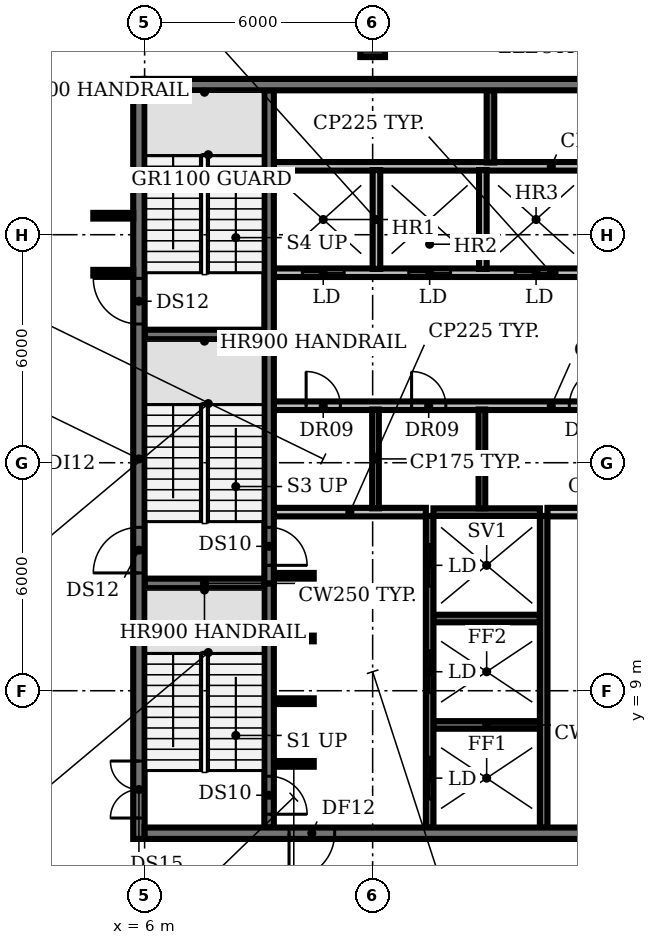
"""IFC4 building model, lengths in metres.
Left out: names, types, materials, properties, quantities, classifications, styles, units other than length and angle.
Written with IfcOpenShell. Run it as: python <this file> out.ifc"""

import sys

from ifc_helpers import new_model, si_unit, direction, frame, frame_2d, origin, origin_2d, place, context, subcontext, project, spatial, rectangle, extrude, element, fill, save


model = new_model("IFC4")
c1 = context("Model", 3, precision=1e-05, world=origin(), true_north=direction((0.0, 1.0)))
c2 = subcontext(c1, "Body", "Model", "MODEL_VIEW")
j1 = project(units=[si_unit("LENGTHUNIT", "METRE"), si_unit("PLANEANGLEUNIT", "RADIAN")], contexts=[c1])
p1 = place(None, origin())
s1 = spatial("IfcSite", under=j1, at=p1, CompositionType="ELEMENT")
p2 = place(p1, origin())
s2 = spatial("IfcBuilding", under=s1, at=p2, CompositionType="ELEMENT")
p3 = place(p2, frame((0.0, 0.0, 272.6)))
s3 = spatial("IfcBuildingStorey", under=s2, at=p3, CompositionType="ELEMENT", Elevation=272.6)
p4 = place(p3, frame((12.0, 26.0, 0.0), z_axis=(0.0, 0.0, 1.0), x_axis=(1.0, 0.0, 0.0)))
e1 = element("IfcColumn", 1, at=p4, inside=s3, PredefinedType="COLUMN", context=c2, shape_type="SweptSolid", body=[
    extrude(rectangle(XDim=0.65, YDim=0.65, at=origin_2d()), origin(), (0.0, 0.0, 1.0), 3.85),
])
p5 = place(p3, frame((9.4, 7.075, 0.0), z_axis=(0.0, 0.0, 1.0), x_axis=(1.0, 0.0, 0.0)))
e2 = element("IfcWall", 2, at=p5, inside=s3, PredefinedType="SHEAR", context=c2, shape_type="SweptSolid", body=[
    extrude(rectangle(XDim=1.05, YDim=0.15, at=frame_2d((0.525, 0.0))), origin(), (0.0, 0.0, 1.0), 3.85),
])
p6 = place(p3, frame((13.6, 8.1, 0.0), z_axis=(0.0, 0.0, 1.0), x_axis=(1.0, 0.0, 0.0)))
e3 = element("IfcWall", 3, at=p6, inside=s3, PredefinedType="SHEAR", context=c2, shape_type="SweptSolid", body=[
    extrude(rectangle(XDim=2.8, YDim=0.2, at=frame_2d((1.4, 0.0))), origin(), (0.0, 0.0, 1.0), 3.85),
])
for number, where, z_axis, x_axis in (
    (4, (9.4, 8.725, 0.0), (0.0, 0.0, 1.0), (1.0, 0.0, 0.0)),
    (5, (9.4, 10.375, 0.0), (0.0, 0.0, 1.0), (1.0, 0.0, 0.0)),
):
    element("IfcWall", number, at=place(p3, frame(where, z_axis=z_axis, x_axis=x_axis)), inside=s3, PredefinedType="SHEAR", context=c2, shape_type="SweptSolid", body=[
        extrude(rectangle(XDim=1.05, YDim=0.15, at=frame_2d((0.525, 0.0))), origin(), (0.0, 0.0, 1.0), 3.85),
    ])
p7 = place(p3, frame((13.6, 10.9, 0.0), z_axis=(0.0, 0.0, 1.0), x_axis=(1.0, 0.0, 0.0)))
e6 = element("IfcWall", 6, at=p7, inside=s3, PredefinedType="SHEAR", context=c2, shape_type="SweptSolid", body=[
    extrude(rectangle(XDim=2.8, YDim=0.2, at=frame_2d((1.4, 0.0))), origin(), (0.0, 0.0, 1.0), 3.85),
])
p8 = place(p3, frame((6.0, 11.825, 0.0), z_axis=(0.0, 0.0, 1.0), x_axis=(1.0, 0.0, 0.0)))
e7 = element("IfcWall", 7, at=p8, inside=s3, PredefinedType="SHEAR", context=c2, shape_type="SweptSolid", body=[
    extrude(rectangle(XDim=3.15, YDim=0.25, at=frame_2d((1.575, 0.0))), origin(), (0.0, 0.0, 1.0), 3.85),
])
p9 = place(p3, frame((9.4, 12.025, 0.0), z_axis=(0.0, 0.0, 1.0), x_axis=(1.0, 0.0, 0.0)))
e8 = element("IfcWall", 8, at=p9, inside=s3, PredefinedType="SHEAR", context=c2, shape_type="SweptSolid", body=[
    extrude(rectangle(XDim=1.05, YDim=0.15, at=frame_2d((0.525, 0.0))), origin(), (0.0, 0.0, 1.0), 3.85),
])
p10 = place(p3, frame((9.4, 13.7, 0.0), z_axis=(0.0, 0.0, 1.0), x_axis=(1.0, 0.0, 0.0)))
e9 = element("IfcWall", 9, at=p10, inside=s3, PredefinedType="PARTITIONING", context=c2, shape_type="SweptSolid", body=[
    extrude(rectangle(XDim=4.0, YDim=0.225, at=frame_2d((2.0, 0.0))), origin(), (0.0, 0.0, 1.0), 3.85),
])
p11 = place(p3, frame((13.6, 13.7, 0.0), z_axis=(0.0, 0.0, 1.0), x_axis=(1.0, 0.0, 0.0)))
e10 = element("IfcWall", 10, at=p11, inside=s3, PredefinedType="SHEAR", context=c2, shape_type="SweptSolid", body=[
    extrude(rectangle(XDim=2.8, YDim=0.2, at=frame_2d((1.4, 0.0))), origin(), (0.0, 0.0, 1.0), 3.85),
])
p12 = place(p3, frame((16.6, 13.7, 0.0), z_axis=(0.0, 0.0, 1.0), x_axis=(1.0, 0.0, 0.0)))
e11 = element("IfcWall", 11, at=p12, inside=s3, PredefinedType="PARTITIONING", context=c2, shape_type="SweptSolid", body=[
    extrude(rectangle(XDim=7.4, YDim=0.225, at=frame_2d((3.7, 0.0))), origin(), (0.0, 0.0, 1.0), 3.85),
])
p13 = place(p3, frame((9.4, 16.5, 0.0), z_axis=(0.0, 0.0, 1.0), x_axis=(1.0, 0.0, 0.0)))
e12 = element("IfcWall", 12, at=p13, inside=s3, PredefinedType="PARTITIONING", context=c2, shape_type="SweptSolid", body=[
    extrude(rectangle(XDim=14.6, YDim=0.225, at=frame_2d((7.3, 0.0))), origin(), (0.0, 0.0, 1.0), 3.85),
])
p14 = place(p13, frame((0.85, 0.0, 0.0)))
e13 = element("IfcOpeningElement", 13, at=p14, cuts=e12, PredefinedType="OPENING", context=c2, shape_type="SweptSolid", body=[
    extrude(rectangle(XDim=0.9, YDim=2.1, at=frame_2d((0.45, 1.05))), frame((0.0, 0.123, 0.0), z_axis=(0.0, -1.0, 0.0), x_axis=(1.0, 0.0, 0.0)), (0.0, 0.0, 1.0), 0.245),
])
p15 = place(p13, frame((3.625, 0.0, 0.0)))
e14 = element("IfcOpeningElement", 14, at=p15, cuts=e12, PredefinedType="OPENING", context=c2, shape_type="SweptSolid", body=[
    extrude(rectangle(XDim=0.9, YDim=2.1, at=frame_2d((0.45, 1.05))), frame((0.0, 0.123, 0.0), z_axis=(0.0, -1.0, 0.0), x_axis=(1.0, 0.0, 0.0)), (0.0, 0.0, 1.0), 0.245),
])
p16 = place(p13, frame((7.775, 0.0, 0.0)))
e15 = element("IfcOpeningElement", 15, at=p16, cuts=e12, PredefinedType="OPENING", context=c2, shape_type="SweptSolid", body=[
    extrude(rectangle(XDim=1.0, YDim=2.1, at=frame_2d((0.5, 1.05))), frame((0.0, 0.123, 0.0), z_axis=(0.0, -1.0, 0.0), x_axis=(1.0, 0.0, 0.0)), (0.0, 0.0, 1.0), 0.245),
])
p17 = place(p13, frame((12.4, 0.0, 0.0)))
e16 = element("IfcOpeningElement", 16, at=p17, cuts=e12, PredefinedType="OPENING", context=c2, shape_type="SweptSolid", body=[
    extrude(rectangle(XDim=1.0, YDim=2.1, at=frame_2d((0.5, 1.05))), frame((0.0, 0.123, 0.0), z_axis=(0.0, -1.0, 0.0), x_axis=(1.0, 0.0, 0.0)), (0.0, 0.0, 1.0), 0.245),
])
p18 = place(p3, frame((6.0, 18.375, 0.0), z_axis=(0.0, 0.0, 1.0), x_axis=(1.0, 0.0, 0.0)))
e17 = element("IfcWall", 17, at=p18, inside=s3, PredefinedType="SHEAR", context=c2, shape_type="SweptSolid", body=[
    extrude(rectangle(XDim=3.15, YDim=0.25, at=frame_2d((1.575, 0.0))), origin(), (0.0, 0.0, 1.0), 3.85),
])
p19 = place(p3, frame((24.0, 20.0, 0.0), z_axis=(0.0, 0.0, 1.0), x_axis=(-1.0, 0.0, 0.0)))
e18 = element("IfcWall", 18, at=p19, inside=s3, PredefinedType="PARTITIONING", context=c2, shape_type="SweptSolid", body=[
    extrude(rectangle(XDim=14.6, YDim=0.225, at=frame_2d((7.3, 0.0))), origin(), (0.0, 0.0, 1.0), 3.85),
])
p20 = place(p19, frame((12.75, 0.0, 0.0)))
e19 = element("IfcOpeningElement", 19, at=p20, cuts=e18, PredefinedType="OPENING", context=c2, shape_type="SweptSolid", body=[
    extrude(rectangle(XDim=1.1, YDim=2.1, at=frame_2d((0.55, 1.05))), frame((0.0, 0.123, 0.0), z_axis=(0.0, -1.0, 0.0), x_axis=(1.0, 0.0, 0.0)), (0.0, 0.0, 1.0), 0.245),
])
p21 = place(p19, frame((9.95, 0.0, 0.0)))
e20 = element("IfcOpeningElement", 20, at=p21, cuts=e18, PredefinedType="OPENING", context=c2, shape_type="SweptSolid", body=[
    extrude(rectangle(XDim=1.1, YDim=2.1, at=frame_2d((0.55, 1.05))), frame((0.0, 0.123, 0.0), z_axis=(0.0, -1.0, 0.0), x_axis=(1.0, 0.0, 0.0)), (0.0, 0.0, 1.0), 0.245),
])
p22 = place(p19, frame((7.15, 0.0, 0.0)))
e21 = element("IfcOpeningElement", 21, at=p22, cuts=e18, PredefinedType="OPENING", context=c2, shape_type="SweptSolid", body=[
    extrude(rectangle(XDim=1.1, YDim=2.1, at=frame_2d((0.55, 1.05))), frame((0.0, 0.123, 0.0), z_axis=(0.0, -1.0, 0.0), x_axis=(1.0, 0.0, 0.0)), (0.0, 0.0, 1.0), 0.245),
])
p23 = place(p19, frame((4.35, 0.0, 0.0)))
e22 = element("IfcOpeningElement", 22, at=p23, cuts=e18, PredefinedType="OPENING", context=c2, shape_type="SweptSolid", body=[
    extrude(rectangle(XDim=1.1, YDim=2.1, at=frame_2d((0.55, 1.05))), frame((0.0, 0.123, 0.0), z_axis=(0.0, -1.0, 0.0), x_axis=(1.0, 0.0, 0.0)), (0.0, 0.0, 1.0), 0.245),
])
p24 = place(p19, frame((1.2, 0.0, 0.0)))
e23 = element("IfcOpeningElement", 23, at=p24, cuts=e18, PredefinedType="OPENING", context=c2, shape_type="SweptSolid", body=[
    extrude(rectangle(XDim=1.0, YDim=2.1, at=frame_2d((0.5, 1.05))), frame((0.0, 0.123, 0.0), z_axis=(0.0, -1.0, 0.0), x_axis=(1.0, 0.0, 0.0)), (0.0, 0.0, 1.0), 0.245),
])
p25 = place(p3, frame((9.4, 22.8, 0.0), z_axis=(0.0, 0.0, 1.0), x_axis=(1.0, 0.0, 0.0)))
e24 = element("IfcWall", 24, at=p25, inside=s3, PredefinedType="PARTITIONING", context=c2, shape_type="SweptSolid", body=[
    extrude(rectangle(XDim=14.6, YDim=0.225, at=frame_2d((7.3, 0.0))), origin(), (0.0, 0.0, 1.0), 3.85),
])
p26 = place(p3, frame((9.275, 11.825, 0.0), z_axis=(0.0, 0.0, 1.0), x_axis=(0.0, -1.0, 0.0)))
e25 = element("IfcWall", 25, at=p26, inside=s3, PredefinedType="SHEAR", context=c2, shape_type="SweptSolid", body=[
    extrude(rectangle(XDim=6.425, YDim=0.25, at=frame_2d((3.212, 0.0))), origin(), (0.0, 0.0, 1.0), 3.85),
])
p27 = place(p26, frame((5.075, 0.0, 0.0)))
e26 = element("IfcOpeningElement", 26, at=p27, cuts=e25, PredefinedType="OPENING", context=c2, shape_type="SweptSolid", body=[
    extrude(rectangle(XDim=1.0, YDim=2.1, at=frame_2d((0.5, 1.05))), frame((0.0, 0.135, 0.0), z_axis=(0.0, -1.0, 0.0), x_axis=(1.0, 0.0, 0.0)), (0.0, 0.0, 1.0), 0.27),
])
p28 = place(p3, frame((9.275, 18.375, 0.0), z_axis=(0.0, 0.0, 1.0), x_axis=(0.0, -1.0, 0.0)))
e27 = element("IfcWall", 27, at=p28, inside=s3, PredefinedType="SHEAR", context=c2, shape_type="SweptSolid", body=[
    extrude(rectangle(XDim=6.55, YDim=0.25, at=frame_2d((3.275, 0.0))), origin(), (0.0, 0.0, 1.0), 3.85),
])
p29 = place(p28, frame((5.075, 0.0, 0.0)))
e28 = element("IfcOpeningElement", 28, at=p29, cuts=e27, PredefinedType="OPENING", context=c2, shape_type="SweptSolid", body=[
    extrude(rectangle(XDim=1.0, YDim=2.1, at=frame_2d((0.5, 1.05))), frame((0.0, 0.135, 0.0), z_axis=(0.0, -1.0, 0.0), x_axis=(1.0, 0.0, 0.0)), (0.0, 0.0, 1.0), 0.27),
])
p30 = place(p3, frame((9.275, 18.375, 0.0), z_axis=(0.0, 0.0, 1.0), x_axis=(0.0, 1.0, 0.0)))
e29 = element("IfcWall", 29, at=p30, inside=s3, PredefinedType="SHEAR", context=c2, shape_type="SweptSolid", body=[
    extrude(rectangle(XDim=6.425, YDim=0.25, at=frame_2d((3.212, 0.0))), origin(), (0.0, 0.0, 1.0), 3.85),
])
p31 = place(p3, frame((12.075, 13.8, 0.0), z_axis=(0.0, 0.0, 1.0), x_axis=(0.0, 1.0, 0.0)))
e30 = element("IfcWall", 30, at=p31, inside=s3, PredefinedType="PARTITIONING", context=c2, shape_type="SweptSolid", body=[
    extrude(rectangle(XDim=2.6, YDim=0.175, at=frame_2d((1.3, 0.0))), origin(), (0.0, 0.0, 1.0), 3.85),
])
p32 = place(p3, frame((12.1, 20.1, 0.0), z_axis=(0.0, 0.0, 1.0), x_axis=(0.0, 1.0, 0.0)))
e31 = element("IfcWall", 31, at=p32, inside=s3, PredefinedType="SOLIDWALL", context=c2, shape_type="SweptSolid", body=[
    extrude(rectangle(XDim=2.6, YDim=0.2, at=frame_2d((1.3, 0.0))), origin(), (0.0, 0.0, 1.0), 3.85),
])
p33 = place(p3, frame((13.5, 5.4, 0.0), z_axis=(0.0, 0.0, 1.0), x_axis=(0.0, 1.0, 0.0)))
e32 = element("IfcWall", 32, at=p33, inside=s3, PredefinedType="SHEAR", context=c2, shape_type="SweptSolid", body=[
    extrude(rectangle(XDim=8.2, YDim=0.2, at=frame_2d((4.1, 0.0))), origin(), (0.0, 0.0, 1.0), 3.85),
])
p34 = place(p33, frame((0.75, 0.0, 0.0)))
e33 = element("IfcOpeningElement", 33, at=p34, cuts=e32, PredefinedType="OPENING", context=c2, shape_type="SweptSolid", body=[
    extrude(rectangle(XDim=1.1, YDim=2.1, at=frame_2d((0.55, 1.05))), frame((0.0, 0.11, 0.0), z_axis=(0.0, -1.0, 0.0), x_axis=(1.0, 0.0, 0.0)), (0.0, 0.0, 1.0), 0.22),
])
p35 = place(p33, frame((3.55, 0.0, 0.0)))
e34 = element("IfcOpeningElement", 34, at=p35, cuts=e32, PredefinedType="OPENING", context=c2, shape_type="SweptSolid", body=[
    extrude(rectangle(XDim=1.1, YDim=2.1, at=frame_2d((0.55, 1.05))), frame((0.0, 0.11, 0.0), z_axis=(0.0, -1.0, 0.0), x_axis=(1.0, 0.0, 0.0)), (0.0, 0.0, 1.0), 0.22),
])
p36 = place(p33, frame((6.35, 0.0, 0.0)))
e35 = element("IfcOpeningElement", 35, at=p36, cuts=e32, PredefinedType="OPENING", context=c2, shape_type="SweptSolid", body=[
    extrude(rectangle(XDim=1.1, YDim=2.1, at=frame_2d((0.55, 1.05))), frame((0.0, 0.11, 0.0), z_axis=(0.0, -1.0, 0.0), x_axis=(1.0, 0.0, 0.0)), (0.0, 0.0, 1.0), 0.22),
])
p37 = place(p3, frame((14.875, 13.8, 0.0), z_axis=(0.0, 0.0, 1.0), x_axis=(0.0, 1.0, 0.0)))
e36 = element("IfcWall", 36, at=p37, inside=s3, PredefinedType="PARTITIONING", context=c2, shape_type="SweptSolid", body=[
    extrude(rectangle(XDim=2.6, YDim=0.175, at=frame_2d((1.3, 0.0))), origin(), (0.0, 0.0, 1.0), 3.85),
])
p38 = place(p3, frame((14.9, 20.1, 0.0), z_axis=(0.0, 0.0, 1.0), x_axis=(0.0, 1.0, 0.0)))
e37 = element("IfcWall", 37, at=p38, inside=s3, PredefinedType="SOLIDWALL", context=c2, shape_type="SweptSolid", body=[
    extrude(rectangle(XDim=2.6, YDim=0.2, at=frame_2d((1.3, 0.0))), origin(), (0.0, 0.0, 1.0), 3.85),
])
p39 = place(p3, frame((15.1, 22.9, 0.0), z_axis=(0.0, 0.0, 1.0), x_axis=(0.0, 1.0, 0.0)))
e38 = element("IfcWall", 38, at=p39, inside=s3, PredefinedType="SHEAR", context=c2, shape_type="SweptSolid", body=[
    extrude(rectangle(XDim=1.9, YDim=0.2, at=frame_2d((0.95, 0.0))), origin(), (0.0, 0.0, 1.0), 3.85),
])
p40 = place(p3, frame((16.5, 5.4, 0.0), z_axis=(0.0, 0.0, 1.0), x_axis=(0.0, 1.0, 0.0)))
e39 = element("IfcWall", 39, at=p40, inside=s3, PredefinedType="SHEAR", context=c2, shape_type="SweptSolid", body=[
    extrude(rectangle(XDim=8.2, YDim=0.2, at=frame_2d((4.1, 0.0))), origin(), (0.0, 0.0, 1.0), 3.85),
])
p41 = place(p3, frame((5.85, 5.1, 0.0), z_axis=(0.0, 0.0, 1.0), x_axis=(0.0, 1.0, 0.0)))
e40 = element("IfcWall", 40, at=p41, inside=s3, PredefinedType="SHEAR", context=c2, shape_type="SweptSolid", body=[
    extrude(rectangle(XDim=20.0, YDim=0.3, at=frame_2d((10.0, 0.0))), origin(), (0.0, 0.0, 1.0), 3.85),
])
p42 = place(p41, frame((0.55, 0.0, 0.0)))
e41 = element("IfcOpeningElement", 41, at=p42, cuts=e40, PredefinedType="OPENING", context=c2, shape_type="SweptSolid", body=[
    extrude(rectangle(XDim=1.5, YDim=2.1, at=frame_2d((0.75, 1.05))), frame((0.0, 0.16, 0.0), z_axis=(0.0, -1.0, 0.0), x_axis=(1.0, 0.0, 0.0)), (0.0, 0.0, 1.0), 0.32),
])
p43 = place(p41, frame((7.0, 0.0, 0.0)))
e42 = element("IfcOpeningElement", 42, at=p43, cuts=e40, PredefinedType="OPENING", context=c2, shape_type="SweptSolid", body=[
    extrude(rectangle(XDim=1.2, YDim=2.1, at=frame_2d((0.6, 1.05))), frame((0.0, 0.16, 0.0), z_axis=(0.0, -1.0, 0.0), x_axis=(1.0, 0.0, 0.0)), (0.0, 0.0, 1.0), 0.32),
])
p44 = place(p41, frame((13.55, 0.0, 0.0)))
e43 = element("IfcOpeningElement", 43, at=p44, cuts=e40, PredefinedType="OPENING", context=c2, shape_type="SweptSolid", body=[
    extrude(rectangle(XDim=1.2, YDim=2.1, at=frame_2d((0.6, 1.05))), frame((0.0, 0.16, 0.0), z_axis=(0.0, -1.0, 0.0), x_axis=(1.0, 0.0, 0.0)), (0.0, 0.0, 1.0), 0.32),
])
p45 = place(p3, frame((24.0, 5.25, 0.0), z_axis=(0.0, 0.0, 1.0), x_axis=(-1.0, 0.0, 0.0)))
e44 = element("IfcWall", 44, at=p45, inside=s3, PredefinedType="SHEAR", context=c2, shape_type="SweptSolid", body=[
    extrude(rectangle(XDim=18.0, YDim=0.3, at=frame_2d((9.0, 0.0))), origin(), (0.0, 0.0, 1.0), 3.85),
])
p46 = place(p45, frame((13.0, 0.0, 0.0)))
e45 = element("IfcOpeningElement", 45, at=p46, cuts=e44, PredefinedType="OPENING", context=c2, shape_type="SweptSolid", body=[
    extrude(rectangle(XDim=1.2, YDim=2.1, at=frame_2d((0.6, 1.05))), frame((0.0, 0.16, 0.0), z_axis=(0.0, -1.0, 0.0), x_axis=(1.0, 0.0, 0.0)), (0.0, 0.0, 1.0), 0.32),
])
p47 = place(p45, frame((4.9, 0.0, 0.0)))
e46 = element("IfcOpeningElement", 46, at=p47, cuts=e44, PredefinedType="OPENING", context=c2, shape_type="SweptSolid", body=[
    extrude(rectangle(XDim=1.0, YDim=2.1, at=frame_2d((0.5, 1.05))), frame((0.0, 0.16, 0.0), z_axis=(0.0, -1.0, 0.0), x_axis=(1.0, 0.0, 0.0)), (0.0, 0.0, 1.0), 0.32),
])
p48 = place(p3, frame((6.0, 24.95, 0.0), z_axis=(0.0, 0.0, 1.0), x_axis=(1.0, 0.0, 0.0)))
e47 = element("IfcWall", 47, at=p48, inside=s3, PredefinedType="SHEAR", context=c2, shape_type="SweptSolid", body=[
    extrude(rectangle(XDim=18.0, YDim=0.3, at=frame_2d((9.0, 0.0))), origin(), (0.0, 0.0, 1.0), 3.85),
])
for number, where, z_axis, x_axis in (
    (48, (4.65, 20.0, 0.0), (0.0, 0.0, 1.0), (1.0, 0.0, 0.0)),
    (49, (4.65, 21.5, 0.0), (0.0, 0.0, 1.0), (1.0, 0.0, 0.0)),
):
    element("IfcWall", number, at=place(p3, frame(where, z_axis=z_axis, x_axis=x_axis)), inside=s3, PredefinedType="PARTITIONING", context=c2, shape_type="SweptSolid", body=[
        extrude(rectangle(XDim=1.05, YDim=0.15, at=frame_2d((0.525, 0.0))), origin(), (0.0, 0.0, 1.0), 2.9),
    ])
p49 = place(p14, origin())
e50 = element("IfcDoor", 50, at=p49, inside=s3, OperationType="SINGLE_SWING_LEFT", PredefinedType="DOOR", context=c2, shape_type="SweptSolid", body=[
    extrude(rectangle(XDim=0.9, YDim=2.1, at=frame_2d((0.45, 1.05))), frame((0.0, 0.025, 0.0), z_axis=(0.0, -1.0, 0.0), x_axis=(1.0, 0.0, 0.0)), (0.0, 0.0, 1.0), 0.05),
])
fill(e13, e50)
p50 = place(p15, origin())
e51 = element("IfcDoor", 51, at=p50, inside=s3, OperationType="SINGLE_SWING_LEFT", PredefinedType="DOOR", context=c2, shape_type="SweptSolid", body=[
    extrude(rectangle(XDim=0.9, YDim=2.1, at=frame_2d((0.45, 1.05))), frame((0.0, 0.025, 0.0), z_axis=(0.0, -1.0, 0.0), x_axis=(1.0, 0.0, 0.0)), (0.0, 0.0, 1.0), 0.05),
])
fill(e14, e51)
p51 = place(p16, origin())
e52 = element("IfcDoor", 52, at=p51, inside=s3, OperationType="SINGLE_SWING_RIGHT", PredefinedType="DOOR", context=c2, shape_type="SweptSolid", body=[
    extrude(rectangle(XDim=1.0, YDim=2.1, at=frame_2d((0.5, 1.05))), frame((0.0, 0.025, 0.0), z_axis=(0.0, -1.0, 0.0), x_axis=(1.0, 0.0, 0.0)), (0.0, 0.0, 1.0), 0.05),
])
fill(e15, e52)
p52 = place(p20, origin())
e53 = element("IfcDoor", 53, at=p52, inside=s3, OperationType="DOUBLE_DOOR_SLIDING", PredefinedType="DOOR", context=c2, shape_type="SweptSolid", body=[
    extrude(rectangle(XDim=1.1, YDim=2.1, at=frame_2d((0.55, 1.05))), frame((0.0, 0.025, 0.0), z_axis=(0.0, -1.0, 0.0), x_axis=(1.0, 0.0, 0.0)), (0.0, 0.0, 1.0), 0.05),
])
fill(e19, e53)
p53 = place(p21, origin())
e54 = element("IfcDoor", 54, at=p53, inside=s3, OperationType="DOUBLE_DOOR_SLIDING", PredefinedType="DOOR", context=c2, shape_type="SweptSolid", body=[
    extrude(rectangle(XDim=1.1, YDim=2.1, at=frame_2d((0.55, 1.05))), frame((0.0, 0.025, 0.0), z_axis=(0.0, -1.0, 0.0), x_axis=(1.0, 0.0, 0.0)), (0.0, 0.0, 1.0), 0.05),
])
fill(e20, e54)
p54 = place(p22, origin())
e55 = element("IfcDoor", 55, at=p54, inside=s3, OperationType="DOUBLE_DOOR_SLIDING", PredefinedType="DOOR", context=c2, shape_type="SweptSolid", body=[
    extrude(rectangle(XDim=1.1, YDim=2.1, at=frame_2d((0.55, 1.05))), frame((0.0, 0.025, 0.0), z_axis=(0.0, -1.0, 0.0), x_axis=(1.0, 0.0, 0.0)), (0.0, 0.0, 1.0), 0.05),
])
fill(e21, e55)
p55 = place(p27, origin())
e56 = element("IfcDoor", 56, at=p55, inside=s3, OperationType="SINGLE_SWING_RIGHT", PredefinedType="DOOR", context=c2, shape_type="SweptSolid", body=[
    extrude(rectangle(XDim=1.0, YDim=2.1, at=frame_2d((0.5, 1.05))), frame((0.0, 0.025, 0.0), z_axis=(0.0, -1.0, 0.0), x_axis=(1.0, 0.0, 0.0)), (0.0, 0.0, 1.0), 0.05),
])
fill(e26, e56)
p56 = place(p29, origin())
e57 = element("IfcDoor", 57, at=p56, inside=s3, OperationType="SINGLE_SWING_RIGHT", PredefinedType="DOOR", context=c2, shape_type="SweptSolid", body=[
    extrude(rectangle(XDim=1.0, YDim=2.1, at=frame_2d((0.5, 1.05))), frame((0.0, 0.025, 0.0), z_axis=(0.0, -1.0, 0.0), x_axis=(1.0, 0.0, 0.0)), (0.0, 0.0, 1.0), 0.05),
])
fill(e28, e57)
p57 = place(p34, origin())
e58 = element("IfcDoor", 58, at=p57, inside=s3, OperationType="DOUBLE_DOOR_SLIDING", PredefinedType="DOOR", context=c2, shape_type="SweptSolid", body=[
    extrude(rectangle(XDim=1.1, YDim=2.1, at=frame_2d((0.55, 1.05))), frame((0.0, 0.025, 0.0), z_axis=(0.0, -1.0, 0.0), x_axis=(1.0, 0.0, 0.0)), (0.0, 0.0, 1.0), 0.05),
])
fill(e33, e58)
p58 = place(p35, origin())
e59 = element("IfcDoor", 59, at=p58, inside=s3, OperationType="DOUBLE_DOOR_SLIDING", PredefinedType="DOOR", context=c2, shape_type="SweptSolid", body=[
    extrude(rectangle(XDim=1.1, YDim=2.1, at=frame_2d((0.55, 1.05))), frame((0.0, 0.025, 0.0), z_axis=(0.0, -1.0, 0.0), x_axis=(1.0, 0.0, 0.0)), (0.0, 0.0, 1.0), 0.05),
])
fill(e34, e59)
p59 = place(p36, origin())
e60 = element("IfcDoor", 60, at=p59, inside=s3, OperationType="DOUBLE_DOOR_SLIDING", PredefinedType="DOOR", context=c2, shape_type="SweptSolid", body=[
    extrude(rectangle(XDim=1.1, YDim=2.1, at=frame_2d((0.55, 1.05))), frame((0.0, 0.025, 0.0), z_axis=(0.0, -1.0, 0.0), x_axis=(1.0, 0.0, 0.0)), (0.0, 0.0, 1.0), 0.05),
])
fill(e35, e60)
p60 = place(p42, origin())
e61 = element("IfcDoor", 61, at=p60, inside=s3, OperationType="DOUBLE_DOOR_SINGLE_SWING", PredefinedType="DOOR", context=c2, shape_type="SweptSolid", body=[
    extrude(rectangle(XDim=1.5, YDim=2.1, at=frame_2d((0.75, 1.05))), frame((0.0, 0.025, 0.0), z_axis=(0.0, -1.0, 0.0), x_axis=(1.0, 0.0, 0.0)), (0.0, 0.0, 1.0), 0.05),
])
fill(e41, e61)
p61 = place(p43, origin())
e62 = element("IfcDoor", 62, at=p61, inside=s3, OperationType="SINGLE_SWING_LEFT", PredefinedType="DOOR", context=c2, shape_type="SweptSolid", body=[
    extrude(rectangle(XDim=1.2, YDim=2.1, at=frame_2d((0.6, 1.05))), frame((0.0, 0.025, 0.0), z_axis=(0.0, -1.0, 0.0), x_axis=(1.0, 0.0, 0.0)), (0.0, 0.0, 1.0), 0.05),
])
fill(e42, e62)
p62 = place(p44, origin())
e63 = element("IfcDoor", 63, at=p62, inside=s3, OperationType="SINGLE_SWING_RIGHT", PredefinedType="DOOR", context=c2, shape_type="SweptSolid", body=[
    extrude(rectangle(XDim=1.2, YDim=2.1, at=frame_2d((0.6, 1.05))), frame((0.0, 0.025, 0.0), z_axis=(0.0, -1.0, 0.0), x_axis=(1.0, 0.0, 0.0)), (0.0, 0.0, 1.0), 0.05),
])
fill(e43, e63)
p63 = place(p46, origin())
e64 = element("IfcDoor", 64, at=p63, inside=s3, OperationType="SINGLE_SWING_RIGHT", PredefinedType="DOOR", context=c2, shape_type="SweptSolid", body=[
    extrude(rectangle(XDim=1.2, YDim=2.1, at=frame_2d((0.6, 1.05))), frame((0.0, 0.025, 0.0), z_axis=(0.0, -1.0, 0.0), x_axis=(1.0, 0.0, 0.0)), (0.0, 0.0, 1.0), 0.05),
])
fill(e45, e64)
save(model, sys.argv[1])
